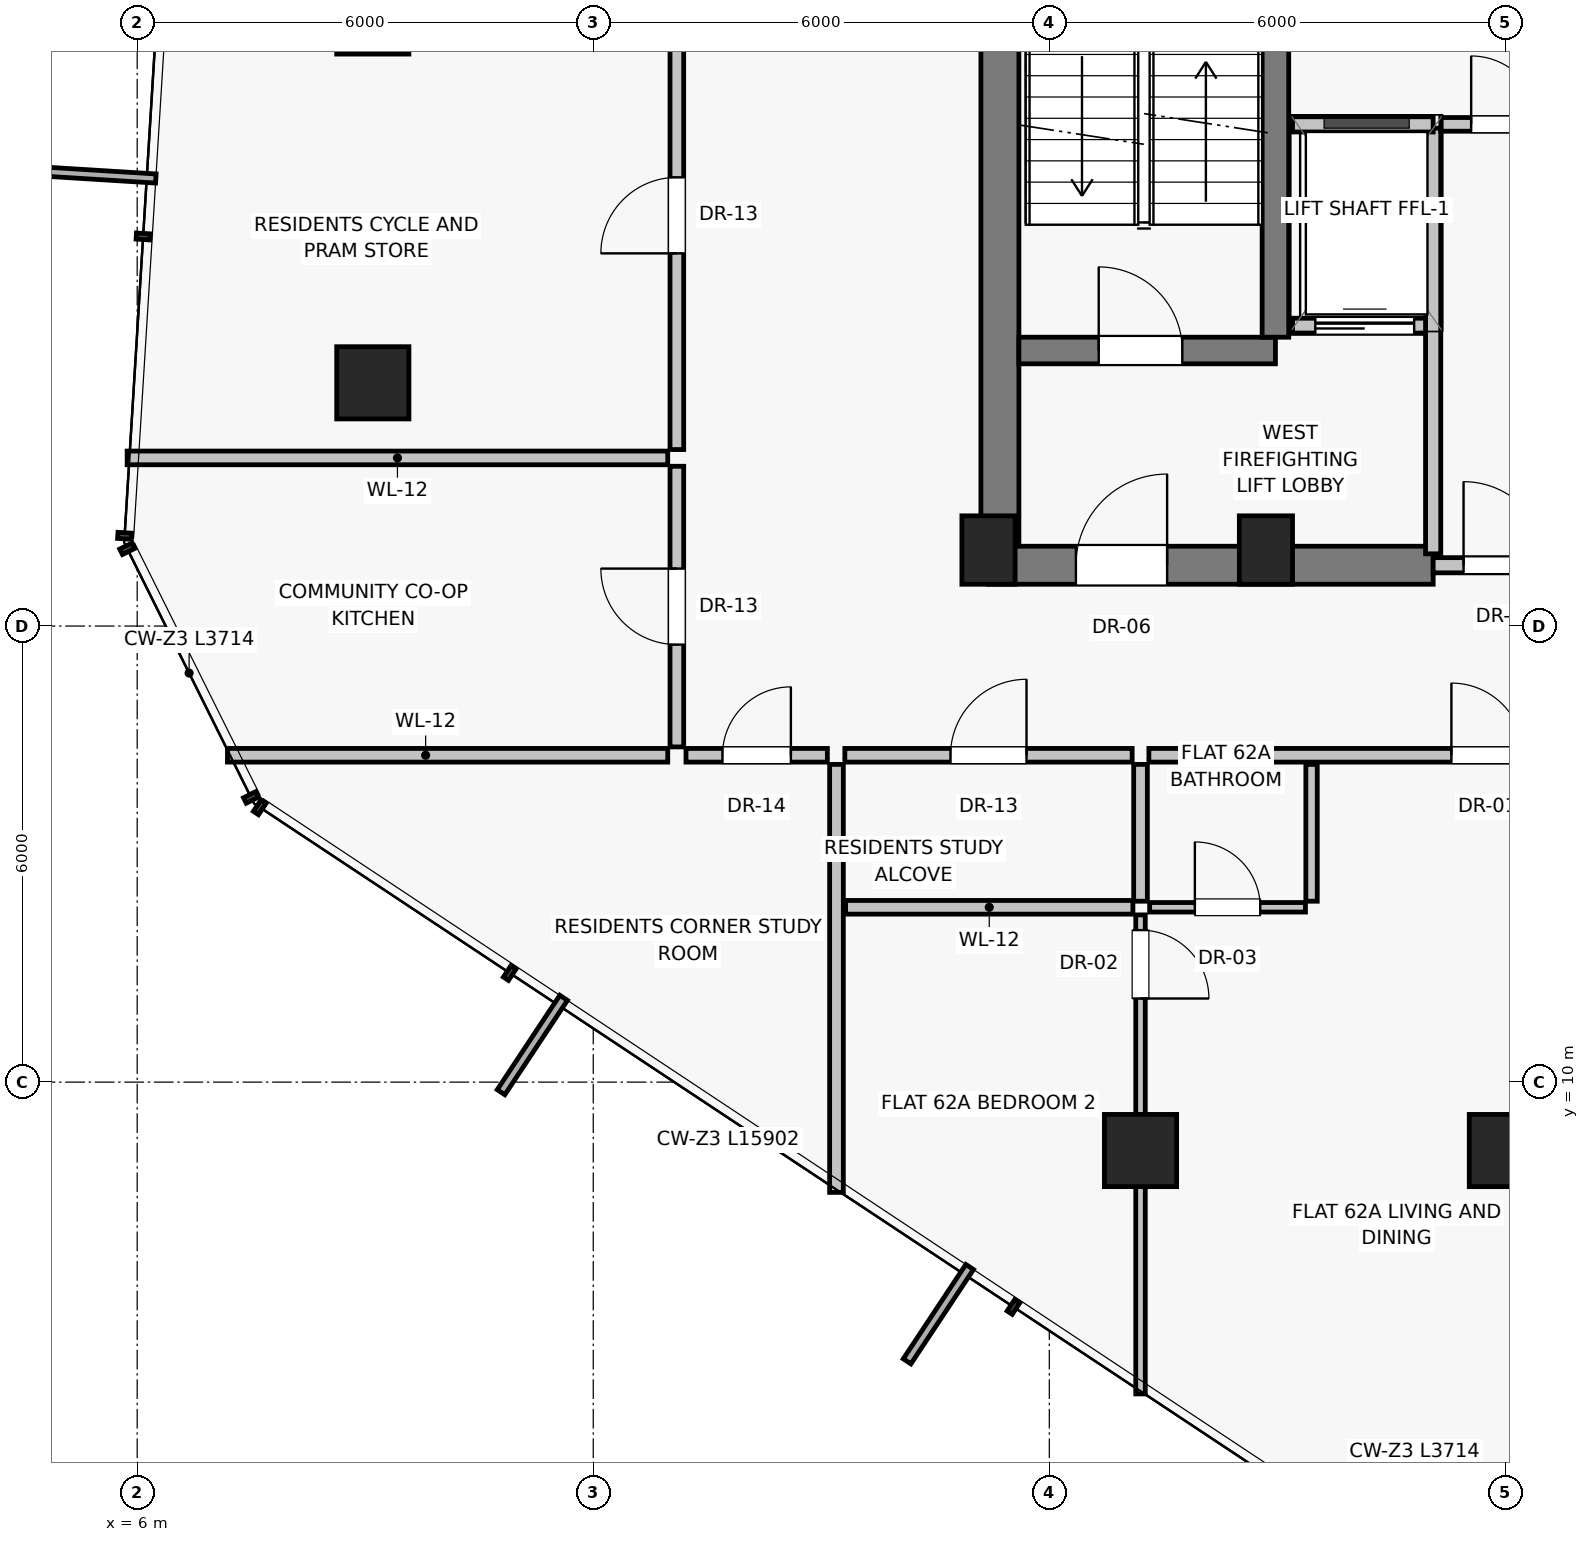
"""IFC4 building model, lengths in metres.
Left out: names, types, materials, properties, quantities, classifications, styles, units other than length and angle.
Written with IfcOpenShell. Run it as: python <this file> out.ifc"""

import sys

from ifc_helpers import new_model, si_unit, direction, frame, frame_2d, origin, origin_2d, place, context, subcontext, project, spatial, rectangle, extrude, source, transform, mapped, element, fill, save


model = new_model("IFC4")
c1 = context("Model", 3, precision=1e-05, world=origin(), true_north=direction((0.0, 1.0)))
c2 = subcontext(c1, "Body", "Model", "MODEL_VIEW")
j1 = project(units=[si_unit("LENGTHUNIT", "METRE"), si_unit("PLANEANGLEUNIT", "RADIAN")], contexts=[c1])
p1 = place(None, origin())
s1 = spatial("IfcSite", under=j1, at=p1, CompositionType="ELEMENT")
p2 = place(p1, origin())
s2 = spatial("IfcBuilding", under=s1, at=p2, CompositionType="ELEMENT")
p3 = place(p2, frame((0.0, 0.0, 218.9)))
s3 = spatial("IfcBuildingStorey", under=s2, at=p3, CompositionType="ELEMENT", Elevation=218.9)
for number, where, z_axis, x_axis in (
    (1, (17.2, 17.0, 0.0), (0.0, 0.0, 1.0), (1.0, 0.0, 0.0)),
    (2, (20.85, 17.0, 0.0), (0.0, 0.0, 1.0), (1.0, 0.0, 0.0)),
):
    element("IfcColumn", number, at=place(p3, frame(where, z_axis=z_axis, x_axis=x_axis)), inside=s3, PredefinedType="PILASTER", context=c2, shape_type="SweptSolid", body=[
        extrude(rectangle(XDim=0.7, YDim=0.9, at=origin_2d()), origin(), (0.0, 0.0, 1.0), 3.25),
    ])
for number, where, z_axis, x_axis in (
    (3, (9.1, 24.0, 0.0), (0.0, 0.0, 1.0), (1.0, 0.0, 0.0)),
    (4, (9.1, 19.2, 0.0), (0.0, 0.0, 1.0), (1.0, 0.0, 0.0)),
    (5, (19.2, 9.1, 0.0), (0.0, 0.0, 1.0), (1.0, 0.0, 0.0)),
    (6, (24.0, 9.1, 0.0), (0.0, 0.0, 1.0), (1.0, 0.0, 0.0)),
):
    element("IfcColumn", number, at=place(p3, frame(where, z_axis=z_axis, x_axis=x_axis)), inside=s3, PredefinedType="COLUMN", context=c2, shape_type="SweptSolid", body=[
        extrude(rectangle(XDim=0.95, YDim=0.95, at=origin_2d()), origin(), (0.0, 0.0, 1.0), 3.25),
    ])
p4 = place(p3, frame((17.35, 16.8, 0.0), z_axis=(0.0, 0.0, 1.0), x_axis=(0.0, 1.0, 0.0)))
e7 = element("IfcWall", 7, at=p4, inside=s3, PredefinedType="SHEAR", context=c2, shape_type="SweptSolid", body=[
    extrude(rectangle(XDim=14.2, YDim=0.5, at=frame_2d((7.1, 0.0))), origin(), (0.0, 0.0, 1.0), 3.015),
])
p5 = place(p3, frame((17.2, 16.8, 0.0), z_axis=(0.0, 0.0, 1.0), x_axis=(1.0, 0.0, 0.0)))
e8 = element("IfcWall", 8, at=p5, inside=s3, PredefinedType="SHEAR", context=c2, shape_type="SweptSolid", body=[
    extrude(rectangle(XDim=5.85, YDim=0.5, at=frame_2d((2.925, 0.0))), origin(), (0.0, 0.0, 1.0), 3.015),
])
p6 = place(p5, frame((1.15, 0.0, 0.0)))
e9 = element("IfcOpeningElement", 9, at=p6, cuts=e8, PredefinedType="OPENING", context=c2, shape_type="SweptSolid", body=[
    extrude(rectangle(XDim=1.2, YDim=2.03, at=frame_2d((0.6, 1.015))), frame((0.0, 0.26, 0.0), z_axis=(0.0, -1.0, 0.0), x_axis=(1.0, 0.0, 0.0)), (0.0, 0.0, 1.0), 0.52),
])
p7 = place(p3, frame((23.05, 16.8, 0.0), z_axis=(0.0, 0.0, 1.0), x_axis=(1.0, 0.0, 0.0)))
e10 = element("IfcWall", 10, at=p7, inside=s3, PredefinedType="SOLIDWALL", context=c2, shape_type="SweptSolid", body=[
    extrude(rectangle(XDim=1.9, YDim=0.2, at=frame_2d((0.95, 0.0))), origin(), (0.0, 0.0, 1.0), 2.165),
])
p8 = place(p7, frame((0.4, 0.0, 0.0)))
e11 = element("IfcOpeningElement", 11, at=p8, cuts=e10, PredefinedType="OPENING", context=c2, shape_type="SweptSolid", body=[
    extrude(rectangle(XDim=1.1, YDim=2.03, at=frame_2d((0.55, 1.015))), frame((0.0, 0.11, 0.0), z_axis=(0.0, -1.0, 0.0), x_axis=(1.0, 0.0, 0.0)), (0.0, 0.0, 1.0), 0.22),
])
p9 = place(p3, frame((17.6, 19.625, 0.0), z_axis=(0.0, 0.0, 1.0), x_axis=(1.0, 0.0, 0.0)))
e12 = element("IfcWall", 12, at=p9, inside=s3, PredefinedType="SHEAR", context=c2, shape_type="SweptSolid", body=[
    extrude(rectangle(XDim=3.375, YDim=0.35, at=frame_2d((1.688, 0.0))), origin(), (0.0, 0.0, 1.0), 3.015),
])
p10 = place(p9, frame((1.05, 0.0, 0.0)))
e13 = element("IfcOpeningElement", 13, at=p10, cuts=e12, PredefinedType="OPENING", context=c2, shape_type="SweptSolid", body=[
    extrude(rectangle(XDim=1.1, YDim=2.03, at=frame_2d((0.55, 1.015))), frame((0.0, 0.185, 0.0), z_axis=(0.0, -1.0, 0.0), x_axis=(1.0, 0.0, 0.0)), (0.0, 0.0, 1.0), 0.37),
])
p11 = place(p3, frame((21.2, 19.95, 0.0), z_axis=(0.0, 0.0, 1.0), x_axis=(1.0, 0.0, 0.0)))
e14 = element("IfcWall", 14, at=p11, inside=s3, PredefinedType="SOLIDWALL", context=c2, shape_type="SweptSolid", body=[
    extrude(rectangle(XDim=1.85, YDim=0.2, at=frame_2d((0.925, 0.0))), origin(), (0.0, 0.0, 1.0), 3.015),
])
p12 = place(p11, frame((0.3, 0.0, 0.0)))
e15 = element("IfcOpeningElement", 15, at=p12, cuts=e14, PredefinedType="OPENING", context=c2, shape_type="SweptSolid", body=[
    extrude(rectangle(XDim=1.3, YDim=2.25, at=frame_2d((0.65, 1.125))), frame((0.0, 0.11, 0.0), z_axis=(0.0, -1.0, 0.0), x_axis=(1.0, 0.0, 0.0)), (0.0, 0.0, 1.0), 0.22),
])
p13 = place(p3, frame((20.975, 19.8, 0.0), z_axis=(0.0, 0.0, 1.0), x_axis=(0.0, 1.0, 0.0)))
e16 = element("IfcWall", 16, at=p13, inside=s3, PredefinedType="SHEAR", context=c2, shape_type="SweptSolid", body=[
    extrude(rectangle(XDim=8.775, YDim=0.35, at=frame_2d((4.387, 0.0))), origin(), (0.0, 0.0, 1.0), 3.015),
])
p14 = place(p3, frame((23.05, 16.95, 0.0), z_axis=(0.0, 0.0, 1.0), x_axis=(0.0, 1.0, 0.0)))
e17 = element("IfcWall", 17, at=p14, inside=s3, PredefinedType="SOLIDWALL", context=c2, shape_type="SweptSolid", body=[
    extrude(rectangle(XDim=5.6, YDim=0.2, at=frame_2d((2.8, 0.0))), origin(), (0.0, 0.0, 1.0), 3.015),
])
p15 = place(p3, frame((21.2, 22.6, 0.0), z_axis=(0.0, 0.0, 1.0), x_axis=(1.0, 0.0, 0.0)))
e18 = element("IfcWall", 18, at=p15, inside=s3, PredefinedType="SOLIDWALL", context=c2, shape_type="SweptSolid", body=[
    extrude(rectangle(XDim=1.85, YDim=0.2, at=frame_2d((0.925, 0.0))), origin(), (0.0, 0.0, 1.0), 3.015),
])
p16 = place(p3, frame((23.15, 22.6, 0.0), z_axis=(0.0, 0.0, 1.0), x_axis=(1.0, 0.0, 0.0)))
e19 = element("IfcWall", 19, at=p16, inside=s3, PredefinedType="PARTITIONING", context=c2, shape_type="SweptSolid", body=[
    extrude(rectangle(XDim=1.7, YDim=0.18, at=frame_2d((0.85, 0.0))), origin(), (0.0, 0.0, 1.0), 3.015),
])
p17 = place(p16, frame((0.4, 0.0, 0.0)))
e20 = element("IfcOpeningElement", 20, at=p17, cuts=e19, PredefinedType="OPENING", context=c2, shape_type="SweptSolid", body=[
    extrude(rectangle(XDim=0.9, YDim=2.01, at=frame_2d((0.45, 1.005))), frame((0.0, 0.1, 0.0), z_axis=(0.0, -1.0, 0.0), x_axis=(1.0, 0.0, 0.0)), (0.0, 0.0, 1.0), 0.2),
])
p18 = place(p3, frame((15.2, 14.18, 0.0), z_axis=(0.0, 0.0, 1.0), x_axis=(0.0, -1.0, 0.0)))
e21 = element("IfcWall", 21, at=p18, inside=s3, PredefinedType="PARTITIONING", context=c2, shape_type="SweptSolid", body=[
    extrude(rectangle(XDim=5.631, YDim=0.18, at=frame_2d((2.815, 0.0))), origin(), (0.0, 0.0, 1.0), 3.015),
])
p19 = place(p3, frame((15.31, 14.3, 0.0), z_axis=(0.0, 0.0, 1.0), x_axis=(1.0, 0.0, 0.0)))
e22 = element("IfcWall", 22, at=p19, inside=s3, PredefinedType="PARTITIONING", context=c2, shape_type="SweptSolid", body=[
    extrude(rectangle(XDim=3.78, YDim=0.18, at=frame_2d((1.89, 0.0))), origin(), (0.0, 0.0, 1.0), 3.015),
])
p20 = place(p19, frame((1.39, 0.0, 0.0)))
e23 = element("IfcOpeningElement", 23, at=p20, cuts=e22, PredefinedType="OPENING", context=c2, shape_type="SweptSolid", body=[
    extrude(rectangle(XDim=1.0, YDim=2.01, at=frame_2d((0.5, 1.005))), frame((0.0, 0.1, 0.0), z_axis=(0.0, -1.0, 0.0), x_axis=(1.0, 0.0, 0.0)), (0.0, 0.0, 1.0), 0.2),
])
p21 = place(p3, frame((19.31, 14.3, 0.0), z_axis=(0.0, 0.0, 1.0), x_axis=(1.0, 0.0, 0.0)))
e24 = element("IfcWall", 24, at=p21, inside=s3, PredefinedType="PARTITIONING", context=c2, shape_type="SweptSolid", body=[
    extrude(rectangle(XDim=11.78, YDim=0.18, at=frame_2d((5.89, 0.0))), origin(), (0.0, 0.0, 1.0), 3.015),
])
p22 = place(p21, frame((3.98, 0.0, 0.0)))
e25 = element("IfcOpeningElement", 25, at=p22, cuts=e24, PredefinedType="OPENING", context=c2, shape_type="SweptSolid", body=[
    extrude(rectangle(XDim=0.95, YDim=2.02, at=frame_2d((0.475, 1.01))), frame((0.0, 0.1, 0.0), z_axis=(0.0, -1.0, 0.0), x_axis=(1.0, 0.0, 0.0)), (0.0, 0.0, 1.0), 0.2),
])
p23 = place(p3, frame((15.32, 12.3, 0.0), z_axis=(0.0, 0.0, 1.0), x_axis=(1.0, 0.0, 0.0)))
e26 = element("IfcWall", 26, at=p23, inside=s3, PredefinedType="PARTITIONING", context=c2, shape_type="SweptSolid", body=[
    extrude(rectangle(XDim=3.78, YDim=0.18, at=frame_2d((1.89, 0.0))), origin(), (0.0, 0.0, 1.0), 3.015),
])
p24 = place(p3, frame((19.2, 14.18, 0.0), z_axis=(0.0, 0.0, 1.0), x_axis=(0.0, -1.0, 0.0)))
e27 = element("IfcWall", 27, at=p24, inside=s3, PredefinedType="PARTITIONING", context=c2, shape_type="SweptSolid", body=[
    extrude(rectangle(XDim=1.8, YDim=0.18, at=frame_2d((0.9, 0.0))), origin(), (0.0, 0.0, 1.0), 3.015),
])
p25 = place(p3, frame((19.2, 12.2, 0.0), z_axis=(0.0, 0.0, 1.0), x_axis=(0.0, -1.0, 0.0)))
e28 = element("IfcWall", 28, at=p25, inside=s3, PredefinedType="PARTITIONING", context=c2, shape_type="SweptSolid", body=[
    extrude(rectangle(XDim=6.302, YDim=0.125, at=frame_2d((3.151, 0.0))), origin(), (0.0, 0.0, 1.0), 2.469),
])
p26 = place(p25, frame((0.2, 0.0, 0.0)))
e29 = element("IfcOpeningElement", 29, at=p26, cuts=e28, PredefinedType="OPENING", context=c2, shape_type="SweptSolid", body=[
    extrude(rectangle(XDim=0.9, YDim=2.01, at=frame_2d((0.45, 1.005))), frame((0.0, 0.073, 0.0), z_axis=(0.0, -1.0, 0.0), x_axis=(1.0, 0.0, 0.0)), (0.0, 0.0, 1.0), 0.145),
])
p27 = place(p3, frame((21.45, 14.18, 0.0), z_axis=(0.0, 0.0, 1.0), x_axis=(0.0, -1.0, 0.0)))
e30 = element("IfcWall", 30, at=p27, inside=s3, PredefinedType="PARTITIONING", context=c2, shape_type="SweptSolid", body=[
    extrude(rectangle(XDim=1.8, YDim=0.15, at=frame_2d((0.9, 0.0))), origin(), (0.0, 0.0, 1.0), 3.015),
])
p28 = place(p3, frame((19.32, 12.3, 0.0), z_axis=(0.0, 0.0, 1.0), x_axis=(1.0, 0.0, 0.0)))
e31 = element("IfcWall", 31, at=p28, inside=s3, PredefinedType="PARTITIONING", context=c2, shape_type="SweptSolid", body=[
    extrude(rectangle(XDim=2.05, YDim=0.125, at=frame_2d((1.025, 0.0))), origin(), (0.0, 0.0, 1.0), 3.015),
])
p29 = place(p28, frame((0.595, 0.0, 0.0)))
e32 = element("IfcOpeningElement", 32, at=p29, cuts=e31, PredefinedType="OPENING", context=c2, shape_type="SweptSolid", body=[
    extrude(rectangle(XDim=0.86, YDim=2.01, at=frame_2d((0.43, 1.005))), frame((0.0, 0.073, 0.0), z_axis=(0.0, -1.0, 0.0), x_axis=(1.0, 0.0, 0.0)), (0.0, 0.0, 1.0), 0.145),
])
p30 = place(p3, frame((12.98, 14.3, 0.0), z_axis=(0.0, 0.0, 1.0), x_axis=(-1.0, 0.0, 0.0)))
e33 = element("IfcWall", 33, at=p30, inside=s3, PredefinedType="PARTITIONING", context=c2, shape_type="SweptSolid", body=[
    extrude(rectangle(XDim=5.792, YDim=0.18, at=frame_2d((2.896, 0.0))), origin(), (0.0, 0.0, 1.0), 3.015),
])
p31 = place(p3, frame((13.1, 14.41, 0.0), z_axis=(0.0, 0.0, 1.0), x_axis=(0.0, 1.0, 0.0)))
e34 = element("IfcWall", 34, at=p31, inside=s3, PredefinedType="PARTITIONING", context=c2, shape_type="SweptSolid", body=[
    extrude(rectangle(XDim=3.692, YDim=0.18, at=frame_2d((1.846, 0.0))), origin(), (0.0, 0.0, 1.0), 2.662),
])
p32 = place(p31, frame((1.346, 0.0, 0.0)))
e35 = element("IfcOpeningElement", 35, at=p32, cuts=e34, PredefinedType="OPENING", context=c2, shape_type="SweptSolid", body=[
    extrude(rectangle(XDim=1.0, YDim=2.01, at=frame_2d((0.5, 1.005))), frame((0.0, 0.1, 0.0), z_axis=(0.0, -1.0, 0.0), x_axis=(1.0, 0.0, 0.0)), (0.0, 0.0, 1.0), 0.2),
])
p33 = place(p3, frame((13.1, 18.322, 0.0), z_axis=(0.0, 0.0, 1.0), x_axis=(0.0, 1.0, 0.0)))
e36 = element("IfcWall", 36, at=p33, inside=s3, PredefinedType="PARTITIONING", context=c2, shape_type="SweptSolid", body=[
    extrude(rectangle(XDim=6.162, YDim=0.18, at=frame_2d((3.081, 0.0))), origin(), (0.0, 0.0, 1.0), 2.662),
])
p34 = place(p33, frame((2.581, 0.0, 0.0)))
e37 = element("IfcOpeningElement", 37, at=p34, cuts=e36, PredefinedType="OPENING", context=c2, shape_type="SweptSolid", body=[
    extrude(rectangle(XDim=1.0, YDim=2.01, at=frame_2d((0.5, 1.005))), frame((0.0, 0.1, 0.0), z_axis=(0.0, -1.0, 0.0), x_axis=(1.0, 0.0, 0.0)), (0.0, 0.0, 1.0), 0.2),
])
p35 = place(p3, frame((12.98, 18.212, 0.0), z_axis=(0.0, 0.0, 1.0), x_axis=(-1.0, 0.0, 0.0)))
e38 = element("IfcWall", 38, at=p35, inside=s3, PredefinedType="PARTITIONING", context=c2, shape_type="SweptSolid", body=[
    extrude(rectangle(XDim=7.112, YDim=0.18, at=frame_2d((3.556, 0.0))), origin(), (0.0, 0.0, 1.0), 2.469),
])
p36 = place(p3, frame((13.22, 14.3, 0.0), z_axis=(0.0, 0.0, 1.0), x_axis=(1.0, 0.0, 0.0)))
e39 = element("IfcWall", 39, at=p36, inside=s3, PredefinedType="PARTITIONING", context=c2, shape_type="SweptSolid", body=[
    extrude(rectangle(XDim=1.86, YDim=0.18, at=frame_2d((0.93, 0.0))), origin(), (0.0, 0.0, 1.0), 3.015),
])
p37 = place(p36, frame((0.48, 0.0, 0.0)))
e40 = element("IfcOpeningElement", 40, at=p37, cuts=e39, PredefinedType="OPENING", context=c2, shape_type="SweptSolid", body=[
    extrude(rectangle(XDim=0.9, YDim=2.01, at=frame_2d((0.45, 1.005))), frame((0.0, 0.1, 0.0), z_axis=(0.0, -1.0, 0.0), x_axis=(1.0, 0.0, 0.0)), (0.0, 0.0, 1.0), 0.2),
])
m1 = source(origin(), c2, "Body", "SweptSolid", [
    extrude(rectangle(XDim=1.2, YDim=2.03, at=frame_2d((0.6, 1.015))), frame((0.0, 0.025, 0.0), z_axis=(0.0, -1.0, 0.0), x_axis=(1.0, 0.0, 0.0)), (0.0, 0.0, 1.0), 0.05),
])
p38 = place(p6, origin())
e41 = element("IfcDoor", 41, at=p38, inside=s3, OperationType="SINGLE_SWING_RIGHT", PredefinedType="DOOR", context=c2, shape_type="MappedRepresentation", body=[
    mapped(m1, transform((0.0, 0.0, 0.0), scale=1.0)),
])
fill(e9, e41)
m2 = source(origin(), c2, "Body", "SweptSolid", [
    extrude(rectangle(XDim=1.1, YDim=2.03, at=frame_2d((0.55, 1.015))), frame((0.0, 0.025, 0.0), z_axis=(0.0, -1.0, 0.0), x_axis=(1.0, 0.0, 0.0)), (0.0, 0.0, 1.0), 0.05),
])
p39 = place(p8, origin())
e42 = element("IfcDoor", 42, at=p39, inside=s3, OperationType="SINGLE_SWING_LEFT", PredefinedType="DOOR", context=c2, shape_type="MappedRepresentation", body=[
    mapped(m2, transform((0.0, 0.0, 0.0), scale=1.0)),
])
fill(e11, e42)
p40 = place(p10, origin())
e43 = element("IfcDoor", 43, at=p40, inside=s3, OperationType="SINGLE_SWING_LEFT", PredefinedType="DOOR", context=c2, shape_type="MappedRepresentation", body=[
    mapped(m2, transform((0.0, 0.0, 0.0), scale=1.0)),
])
fill(e13, e43)
m3 = source(origin(), c2, "Body", "SweptSolid", [
    extrude(rectangle(XDim=1.3, YDim=2.25, at=frame_2d((0.65, 1.125))), frame((0.0, 0.025, 0.0), z_axis=(0.0, -1.0, 0.0), x_axis=(1.0, 0.0, 0.0)), (0.0, 0.0, 1.0), 0.05),
])
p41 = place(p12, origin())
e44 = element("IfcDoor", 44, at=p41, inside=s3, OperationType="SLIDING_TO_LEFT", PredefinedType="DOOR", context=c2, shape_type="MappedRepresentation", body=[
    mapped(m3, transform((0.0, 0.0, 0.0), scale=1.0)),
])
fill(e15, e44)
m4 = source(origin(), c2, "Body", "SweptSolid", [
    extrude(rectangle(XDim=0.9, YDim=2.01, at=frame_2d((0.45, 1.005))), frame((0.0, 0.025, 0.0), z_axis=(0.0, -1.0, 0.0), x_axis=(1.0, 0.0, 0.0)), (0.0, 0.0, 1.0), 0.05),
])
p42 = place(p17, origin())
e45 = element("IfcDoor", 45, at=p42, inside=s3, OperationType="SINGLE_SWING_LEFT", PredefinedType="DOOR", context=c2, shape_type="MappedRepresentation", body=[
    mapped(m4, transform((0.0, 0.0, 0.0), scale=1.0)),
])
fill(e20, e45)
m5 = source(origin(), c2, "Body", "SweptSolid", [
    extrude(rectangle(XDim=1.0, YDim=2.01, at=frame_2d((0.5, 1.005))), frame((0.0, 0.025, 0.0), z_axis=(0.0, -1.0, 0.0), x_axis=(1.0, 0.0, 0.0)), (0.0, 0.0, 1.0), 0.05),
])
p43 = place(p20, origin())
e46 = element("IfcDoor", 46, at=p43, inside=s3, OperationType="SINGLE_SWING_RIGHT", PredefinedType="DOOR", context=c2, shape_type="MappedRepresentation", body=[
    mapped(m5, transform((0.0, 0.0, 0.0), scale=1.0)),
])
fill(e23, e46)
m6 = source(origin(), c2, "Body", "SweptSolid", [
    extrude(rectangle(XDim=0.95, YDim=2.02, at=frame_2d((0.475, 1.01))), frame((0.0, 0.025, 0.0), z_axis=(0.0, -1.0, 0.0), x_axis=(1.0, 0.0, 0.0)), (0.0, 0.0, 1.0), 0.05),
])
p44 = place(p22, origin())
e47 = element("IfcDoor", 47, at=p44, inside=s3, OperationType="SINGLE_SWING_LEFT", PredefinedType="DOOR", context=c2, shape_type="MappedRepresentation", body=[
    mapped(m6, transform((0.0, 0.0, 0.0), scale=1.0)),
])
fill(e25, e47)
p45 = place(p26, origin())
e48 = element("IfcDoor", 48, at=p45, inside=s3, OperationType="SINGLE_SWING_RIGHT", PredefinedType="DOOR", context=c2, shape_type="MappedRepresentation", body=[
    mapped(m4, transform((0.0, 0.0, 0.0), scale=1.0)),
])
fill(e29, e48)
m7 = source(origin(), c2, "Body", "SweptSolid", [
    extrude(rectangle(XDim=0.86, YDim=2.01, at=frame_2d((0.43, 1.005))), frame((0.0, 0.025, 0.0), z_axis=(0.0, -1.0, 0.0), x_axis=(1.0, 0.0, 0.0)), (0.0, 0.0, 1.0), 0.05),
])
p46 = place(p29, origin())
e49 = element("IfcDoor", 49, at=p46, inside=s3, OperationType="SINGLE_SWING_LEFT", PredefinedType="DOOR", context=c2, shape_type="MappedRepresentation", body=[
    mapped(m7, transform((0.0, 0.0, 0.0), scale=1.0)),
])
fill(e32, e49)
p47 = place(p32, origin())
e50 = element("IfcDoor", 50, at=p47, inside=s3, OperationType="SINGLE_SWING_RIGHT", PredefinedType="DOOR", context=c2, shape_type="MappedRepresentation", body=[
    mapped(m5, transform((0.0, 0.0, 0.0), scale=1.0)),
])
fill(e35, e50)
p48 = place(p34, origin())
e51 = element("IfcDoor", 51, at=p48, inside=s3, OperationType="SINGLE_SWING_LEFT", PredefinedType="DOOR", context=c2, shape_type="MappedRepresentation", body=[
    mapped(m5, transform((0.0, 0.0, 0.0), scale=1.0)),
])
fill(e37, e51)
p49 = place(p37, origin())
e52 = element("IfcDoor", 52, at=p49, inside=s3, OperationType="SINGLE_SWING_RIGHT", PredefinedType="DOOR", context=c2, shape_type="MappedRepresentation", body=[
    mapped(m4, transform((0.0, 0.0, 0.0), scale=1.0)),
])
fill(e40, e52)
save(model, sys.argv[1])
